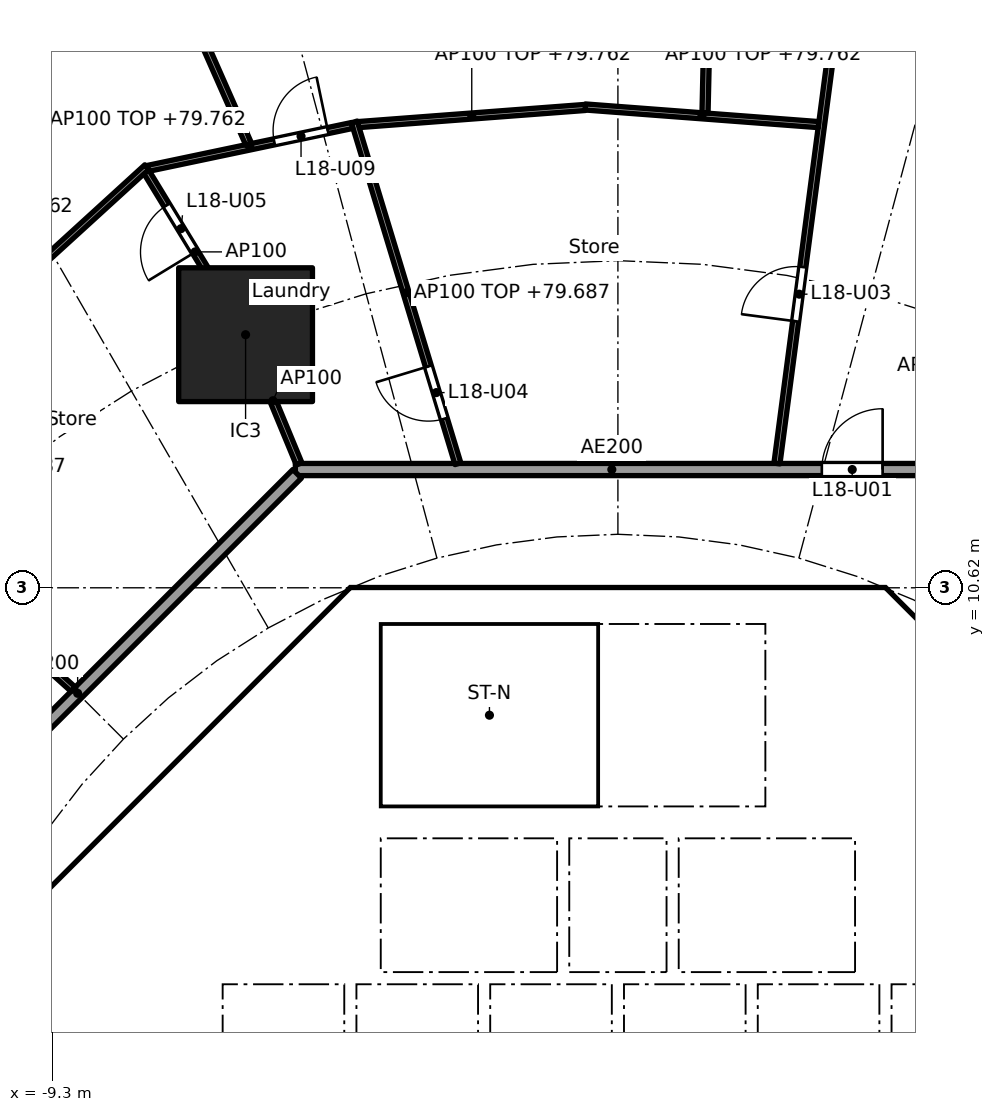
"""IFC4 building model, lengths in metres.
Left out: names, types, materials, properties, quantities, classifications, styles, units other than length and angle.
Written with IfcOpenShell. Run it as: python <this file> out.ifc"""

import sys

from ifc_helpers import new_model, si_unit, direction, frame, frame_2d, origin, origin_2d, place, context, subcontext, project, spatial, polyline, rectangle, outline, extrude, element, fill, save


model = new_model("IFC4")
c1 = context("Model", 3, precision=1e-05, world=origin(), true_north=direction((0.0, 1.0)))
c2 = subcontext(c1, "Body", "Model", "MODEL_VIEW")
j1 = project(units=[si_unit("LENGTHUNIT", "METRE"), si_unit("PLANEANGLEUNIT", "RADIAN")], contexts=[c1])
p1 = place(None, origin())
s1 = spatial("IfcSite", under=j1, at=p1, CompositionType="ELEMENT")
p2 = place(p1, origin())
s2 = spatial("IfcBuilding", under=s1, at=p2, CompositionType="ELEMENT")
p3 = place(p2, frame((0.0, 0.0, 77.0)))
s3 = spatial("IfcBuildingStorey", under=s2, at=p3, CompositionType="ELEMENT", Elevation=77.0)
p4 = place(p3, frame((-6.123, 14.782, 0.0), z_axis=(0.0, 0.0, 1.0), x_axis=(1.0, 0.0, 0.0)))
e1 = element("IfcColumn", 1, at=p4, inside=s3, PredefinedType="COLUMN", context=c2, shape_type="SweptSolid", body=[
    extrude(rectangle(XDim=2.2, YDim=2.2, at=origin_2d()), origin(), (0.0, 0.0, 1.0), 3.7),
])
p5 = place(p3, frame((9.988, 4.613, 0.0), z_axis=(0.0, 0.0, 1.0), x_axis=(-0.707106781187, 0.707106781187, 0.0)))
e2 = element("IfcWall", 2, at=p5, inside=s3, PredefinedType="SHEAR", context=c2, shape_type="SweptSolid", body=[
    extrude(rectangle(XDim=7.602, YDim=0.6, at=frame_2d((3.801, 0.0))), origin(), (0.0, 0.0, 1.0), 3.44),
])
p6 = place(p5, frame((3.201, 0.0, 0.0)))
e3 = element("IfcOpeningElement", 3, at=p6, cuts=e2, PredefinedType="OPENING", context=c2, shape_type="SweptSolid", body=[
    extrude(rectangle(XDim=1.2, YDim=2.1, at=frame_2d((0.6, 1.05))), frame((0.0, 0.31, 0.0), z_axis=(0.0, -1.0, 0.0), x_axis=(1.0, 0.0, 0.0)), (0.0, 0.0, 1.0), 0.62),
])
p7 = place(p3, frame((-4.613, 9.988, 0.0), z_axis=(0.0, 0.0, 1.0), x_axis=(-0.707106781187, -0.707106781187, 0.0)))
e4 = element("IfcWall", 4, at=p7, inside=s3, PredefinedType="SHEAR", context=c2, shape_type="SweptSolid", body=[
    extrude(rectangle(XDim=7.602, YDim=0.6, at=frame_2d((3.801, 0.0))), origin(), (0.0, 0.0, 1.0), 3.44),
])
p8 = place(p7, frame((0.351, 0.0, 0.0)))
e5 = element("IfcOpeningElement", 5, at=p8, cuts=e4, PredefinedType="OPENING", context=c2, shape_type="SweptSolid", body=[
    extrude(rectangle(XDim=1.1, YDim=2.1, at=frame_2d((0.55, 1.05))), frame((0.0, 0.31, 0.0), z_axis=(0.0, -1.0, 0.0), x_axis=(1.0, 0.0, 0.0)), (0.0, 0.0, 1.0), 0.62),
])
p9 = place(p3, frame((-6.2, 4.3, 0.0), z_axis=(0.0, 0.0, 1.0), x_axis=(0.0, 1.0, 0.0)))
e6 = element("IfcWall", 6, at=p9, inside=s3, PredefinedType="PARTITIONING", context=c2, shape_type="SweptSolid", body=[
    extrude(rectangle(XDim=3.527, YDim=0.15, at=frame_2d((1.763, 0.0))), origin(), (0.0, 0.0, 1.0), 3.44),
])
p10 = place(p9, frame((0.262, 0.0, 0.0)))
e7 = element("IfcOpeningElement", 7, at=p10, cuts=e6, PredefinedType="OPENING", context=c2, shape_type="SweptSolid", body=[
    extrude(rectangle(XDim=0.9, YDim=2.1, at=frame_2d((0.45, 1.05))), frame((0.0, 0.085, 0.0), z_axis=(0.0, -1.0, 0.0), x_axis=(1.0, 0.0, 0.0)), (0.0, 0.0, 1.0), 0.17),
])
p11 = place(p9, frame((2.138, 0.0, 0.0)))
e8 = element("IfcOpeningElement", 8, at=p11, cuts=e6, PredefinedType="OPENING", context=c2, shape_type="SweptSolid", body=[
    extrude(rectangle(XDim=0.9, YDim=2.1, at=frame_2d((0.45, 1.05))), frame((0.0, 0.085, 0.0), z_axis=(0.0, -1.0, 0.0), x_axis=(1.0, 0.0, 0.0)), (0.0, 0.0, 1.0), 0.17),
])
p12 = place(p3, frame((4.0, 4.3, 0.0), z_axis=(0.0, 0.0, 1.0), x_axis=(0.0, 1.0, 0.0)))
e9 = element("IfcWall", 9, at=p12, inside=s3, PredefinedType="SOLIDWALL", context=c2, shape_type="SweptSolid", body=[
    extrude(rectangle(XDim=2.2, YDim=0.2, at=frame_2d((1.1, 0.0))), origin(), (0.0, 0.0, 1.0), 3.44),
])
p13 = place(p12, frame((0.55, 0.0, 0.0)))
e10 = element("IfcOpeningElement", 10, at=p13, cuts=e9, PredefinedType="OPENING", context=c2, shape_type="SweptSolid", body=[
    extrude(rectangle(XDim=1.1, YDim=2.1, at=frame_2d((0.55, 1.05))), frame((0.0, 0.11, 0.0), z_axis=(0.0, -1.0, 0.0), x_axis=(1.0, 0.0, 0.0)), (0.0, 0.0, 1.0), 0.22),
])
p14 = place(p3, frame((-4.0, 4.3, 0.0), z_axis=(0.0, 0.0, 1.0), x_axis=(0.0, 1.0, 0.0)))
e11 = element("IfcWall", 11, at=p14, inside=s3, PredefinedType="SOLIDWALL", context=c2, shape_type="SweptSolid", body=[
    extrude(rectangle(XDim=2.2, YDim=0.2, at=frame_2d((1.1, 0.0))), origin(), (0.0, 0.0, 1.0), 3.44),
])
p15 = place(p14, frame((0.55, 0.0, 0.0)))
e12 = element("IfcOpeningElement", 12, at=p15, cuts=e11, PredefinedType="OPENING", context=c2, shape_type="SweptSolid", body=[
    extrude(rectangle(XDim=1.1, YDim=2.1, at=frame_2d((0.55, 1.05))), frame((0.0, 0.11, 0.0), z_axis=(0.0, -1.0, 0.0), x_axis=(1.0, 0.0, 0.0)), (0.0, 0.0, 1.0), 0.22),
])
p16 = place(p3, frame((4.0, 7.025, 0.0), z_axis=(0.0, 0.0, 1.0), x_axis=(0.0, 1.0, 0.0)))
e13 = element("IfcWall", 13, at=p16, inside=s3, PredefinedType="SOLIDWALL", context=c2, shape_type="SweptSolid", body=[
    extrude(rectangle(XDim=3.0, YDim=0.2, at=frame_2d((1.5, 0.0))), origin(), (0.0, 0.0, 1.0), 3.44),
])
p17 = place(p16, frame((0.925, 0.0, 0.0)))
e14 = element("IfcOpeningElement", 14, at=p17, cuts=e13, PredefinedType="OPENING", context=c2, shape_type="SweptSolid", body=[
    extrude(rectangle(XDim=1.1, YDim=2.1, at=frame_2d((0.55, 1.05))), frame((0.0, 0.11, 0.0), z_axis=(0.0, -1.0, 0.0), x_axis=(1.0, 0.0, 0.0)), (0.0, 0.0, 1.0), 0.22),
])
p18 = place(p3, origin())
e15 = element("IfcWall", 15, at=p18, inside=s3, PredefinedType="SHEAR", context=c2, shape_type="SweptSolid", body=[
    extrude(outline(polyline([(-4.152, 10.025), (-4.401, 9.776), (-4.825, 10.2), (-4.401, 10.625), (4.401, 10.625), (4.825, 10.2), (4.401, 9.776), (4.152, 10.025), (-4.152, 10.025)])), origin(), (0.0, 0.0, 1.0), 3.44),
])
p19 = place(p3, frame((-10.025, 4.0, 0.0), z_axis=(0.0, 0.0, 1.0), x_axis=(1.0, 0.0, 0.0)))
e16 = element("IfcWall", 16, at=p19, inside=s3, PredefinedType="PARTITIONING", context=c2, shape_type="SweptSolid", body=[
    extrude(rectangle(XDim=3.325, YDim=0.2, at=frame_2d((1.662, 0.0))), origin(), (0.0, 0.0, 1.0), 3.44),
])
p20 = place(p3, frame((-8.301, 5.8, 0.0), z_axis=(0.0, 0.0, 1.0), x_axis=(1.0, 0.0, 0.0)))
e17 = element("IfcWall", 17, at=p20, inside=s3, PredefinedType="PARTITIONING", context=c2, shape_type="SweptSolid", body=[
    extrude(rectangle(XDim=2.026, YDim=0.15, at=frame_2d((1.013, 0.0))), origin(), (0.0, 0.0, 1.0), 3.44),
])
for number, where, z_axis, x_axis in (
    (18, (-0.9, 4.3, 0.0), (0.0, 0.0, 1.0), (0.0, 1.0, 0.0)),
    (19, (0.9, 4.3, 0.0), (0.0, 0.0, 1.0), (0.0, 1.0, 0.0)),
):
    element("IfcWall", number, at=place(p3, frame(where, z_axis=z_axis, x_axis=x_axis)), inside=s3, PredefinedType="SOLIDWALL", context=c2, shape_type="SweptSolid", body=[
        extrude(rectangle(XDim=2.2, YDim=0.2, at=frame_2d((1.1, 0.0))), origin(), (0.0, 0.0, 1.0), 3.44),
    ])
p21 = place(p3, origin())
e20 = element("IfcWall", 20, at=p21, inside=s3, PredefinedType="SOLIDWALL", context=c2, shape_type="SweptSolid", body=[
    extrude(outline(polyline([(-6.5, 2.1), (-6.7, 2.1), (-6.7, 4.3), (6.7, 4.3), (6.7, 2.1), (6.5, 2.1), (6.5, 4.1), (4.5, 4.1), (4.5, 2.1), (4.3, 2.1), (4.3, 4.1), (2.3, 4.1), (2.3, 2.1), (2.1, 2.1), (2.1, 4.1), (0.1, 4.1), (0.1, 2.1), (-0.1, 2.1), (-0.1, 4.1), (-2.1, 4.1), (-2.1, 2.1), (-2.3, 2.1), (-2.3, 4.1), (-4.3, 4.1), (-4.3, 2.1), (-4.5, 2.1), (-4.5, 4.1), (-6.5, 4.1), (-6.5, 2.1)])), origin(), (0.0, 0.0, 1.0), 3.44),
])
p22 = place(p3, origin())
e21 = element("IfcWall", 21, at=p22, inside=s3, PredefinedType="SOLIDWALL", context=c2, shape_type="SweptSolid", body=[
    extrude(outline(polyline([(-3.9, 7.025), (-4.1, 7.025), (-4.1, 10.025), (-3.9, 10.025), (-3.9, 7.025)])), origin(), (0.0, 0.0, 1.0), 3.44),
])
p23 = place(p3, origin())
e22 = element("IfcWall", 22, at=p23, inside=s3, PredefinedType="SOLIDWALL", context=c2, shape_type="SweptSolid", body=[
    extrude(outline(polyline([(4.1, 6.5), (-4.1, 6.5), (-4.1, 7.025), (4.1, 7.025), (4.1, 6.5)])), origin(), (0.0, 0.0, 1.0), 3.44),
])
p24 = place(p3, frame((5.104, 12.565, 0.0), z_axis=(0.0, 0.0, 1.0), x_axis=(-1.0, 0.0, 0.0)))
e23 = element("IfcWall", 23, at=p24, inside=s3, PredefinedType="PARTITIONING", context=c2, shape_type="SweptSolid", body=[
    extrude(rectangle(XDim=10.409, YDim=0.2, at=frame_2d((5.205, 0.0))), origin(), (0.0, 0.0, 1.0), 3.44),
])
p25 = place(p24, frame((0.751, 0.0, 0.0)))
e24 = element("IfcOpeningElement", 24, at=p25, cuts=e23, PredefinedType="OPENING", context=c2, shape_type="SweptSolid", body=[
    extrude(rectangle(XDim=1.0, YDim=2.1, at=frame_2d((0.5, 1.05))), frame((0.0, 0.11, 0.0), z_axis=(0.0, -1.0, 0.0), x_axis=(1.0, 0.0, 0.0)), (0.0, 0.0, 1.0), 0.22),
])
p26 = place(p3, frame((-5.275, 12.494, 0.0), z_axis=(0.0, 0.0, 1.0), x_axis=(-0.707106781187, -0.707106781187, 0.0)))
e25 = element("IfcWall", 25, at=p26, inside=s3, PredefinedType="PARTITIONING", context=c2, shape_type="SweptSolid", body=[
    extrude(rectangle(XDim=10.209, YDim=0.2, at=frame_2d((5.104, 0.0))), origin(), (0.0, 0.0, 1.0), 3.44),
])
p27 = place(p3, frame((2.615, 12.664, 0.0), z_axis=(0.0, 0.0, 1.0), x_axis=(0.130614967904, 0.99143316979, 0.0)))
e26 = element("IfcWall", 26, at=p27, inside=s3, PredefinedType="PARTITIONING", context=c2, shape_type="SweptSolid", body=[
    extrude(rectangle(XDim=20.034, YDim=0.1, at=frame_2d((10.017, 0.0))), origin(), (0.0, 0.0, 1.0), 2.687),
])
p28 = place(p27, frame((2.359, 0.0, 0.0)))
e27 = element("IfcOpeningElement", 27, at=p28, cuts=e26, PredefinedType="OPENING", context=c2, shape_type="SweptSolid", body=[
    extrude(rectangle(XDim=0.9, YDim=2.1, at=frame_2d((0.45, 1.05))), frame((0.0, 0.06, 0.0), z_axis=(0.0, -1.0, 0.0), x_axis=(1.0, 0.0, 0.0)), (0.0, 0.0, 1.0), 0.12),
])
p29 = place(p27, frame((8.873, 0.0, 0.0)))
e28 = element("IfcOpeningElement", 28, at=p29, cuts=e26, PredefinedType="OPENING", context=c2, shape_type="SweptSolid", body=[
    extrude(rectangle(XDim=0.9, YDim=2.1, at=frame_2d((0.45, 1.05))), frame((0.0, 0.06, 0.0), z_axis=(0.0, -1.0, 0.0), x_axis=(1.0, 0.0, 0.0)), (0.0, 0.0, 1.0), 0.12),
])
p30 = place(p3, frame((3.299, 18.237, 0.0), z_axis=(0.0, 0.0, 1.0), x_axis=(-0.997152243414, 0.075414875552, 0.0)))
e29 = element("IfcWall", 29, at=p30, inside=s3, PredefinedType="PARTITIONING", context=c2, shape_type="SweptSolid", body=[
    extrude(rectangle(XDim=3.846, YDim=0.1, at=frame_2d((1.923, 0.0))), origin(), (0.0, 0.0, 1.0), 2.762),
])
p31 = place(p3, frame((1.433, 18.428, 0.0), z_axis=(0.0, 0.0, 1.0), x_axis=(0.022419421812, 0.999748653175, 0.0)))
e30 = element("IfcWall", 30, at=p31, inside=s3, PredefinedType="PARTITIONING", context=c2, shape_type="SweptSolid", body=[
    extrude(rectangle(XDim=7.438, YDim=0.1, at=frame_2d((3.719, 0.0))), origin(), (0.0, 0.0, 1.0), 3.44),
])
p32 = place(p3, frame((-0.536, 18.519, 0.0), z_axis=(0.0, 0.0, 1.0), x_axis=(-0.99715294352, -0.075405618017, 0.0)))
e31 = element("IfcWall", 31, at=p32, inside=s3, PredefinedType="PARTITIONING", context=c2, shape_type="SweptSolid", body=[
    extrude(rectangle(XDim=3.746, YDim=0.1, at=frame_2d((1.873, 0.0))), origin(), (0.0, 0.0, 1.0), 2.762),
])
p33 = place(p3, frame((-2.631, 12.66, 0.0), z_axis=(0.0, 0.0, 1.0), x_axis=(-0.290145836284, 0.956982441682, 0.0)))
e32 = element("IfcWall", 32, at=p33, inside=s3, PredefinedType="PARTITIONING", context=c2, shape_type="SweptSolid", body=[
    extrude(rectangle(XDim=5.873, YDim=0.1, at=frame_2d((2.937, 0.0))), origin(), (0.0, 0.0, 1.0), 2.687),
])
p34 = place(p33, frame((0.772, 0.0, 0.0)))
e33 = element("IfcOpeningElement", 33, at=p34, cuts=e32, PredefinedType="OPENING", context=c2, shape_type="SweptSolid", body=[
    extrude(rectangle(XDim=0.9, YDim=2.1, at=frame_2d((0.45, 1.05))), frame((0.0, 0.06, 0.0), z_axis=(0.0, -1.0, 0.0), x_axis=(1.0, 0.0, 0.0)), (0.0, 0.0, 1.0), 0.12),
])
p35 = place(p3, frame((-4.37, 18.223, 0.0), z_axis=(0.0, 0.0, 1.0), x_axis=(-0.978619056583, -0.205681166112, 0.0)))
e34 = element("IfcWall", 34, at=p35, inside=s3, PredefinedType="PARTITIONING", context=c2, shape_type="SweptSolid", body=[
    extrude(rectangle(XDim=3.438, YDim=0.1, at=frame_2d((1.719, 0.0))), origin(), (0.0, 0.0, 1.0), 2.762),
])
p36 = place(p35, frame((0.409, 0.0, 0.0)))
e35 = element("IfcOpeningElement", 35, at=p36, cuts=e34, PredefinedType="OPENING", context=c2, shape_type="SweptSolid", body=[
    extrude(rectangle(XDim=0.9, YDim=2.1, at=frame_2d((0.45, 1.05))), frame((0.0, 0.06, 0.0), z_axis=(0.0, -1.0, 0.0), x_axis=(1.0, 0.0, 0.0)), (0.0, 0.0, 1.0), 0.12),
])
p37 = place(p3, frame((-6.072, 17.915, 0.0), z_axis=(0.0, 0.0, 1.0), x_axis=(-0.404139814253, 0.914697223422, 0.0)))
e36 = element("IfcWall", 36, at=p37, inside=s3, PredefinedType="PARTITIONING", context=c2, shape_type="SweptSolid", body=[
    extrude(rectangle(XDim=15.614, YDim=0.1, at=frame_2d((7.807, 0.0))), origin(), (0.0, 0.0, 1.0), 2.837),
])
p38 = place(p37, frame((3.226, 0.0, 0.0)))
e37 = element("IfcOpeningElement", 37, at=p38, cuts=e36, PredefinedType="OPENING", context=c2, shape_type="SweptSolid", body=[
    extrude(rectangle(XDim=0.9, YDim=2.1, at=frame_2d((0.45, 1.05))), frame((0.0, 0.06, 0.0), z_axis=(0.0, -1.0, 0.0), x_axis=(1.0, 0.0, 0.0)), (0.0, 0.0, 1.0), 0.12),
])
p39 = place(p3, frame((-5.243, 12.657, 0.0), z_axis=(0.0, 0.0, 1.0), x_axis=(-0.382703272338, 0.923871314276, 0.0)))
e38 = element("IfcWall", 38, at=p39, inside=s3, PredefinedType="PARTITIONING", context=c2, shape_type="SweptSolid", body=[
    extrude(rectangle(XDim=2.249, YDim=0.1, at=frame_2d((1.125, 0.0))), origin(), (0.0, 0.0, 1.0), 3.44),
])
p40 = place(p3, frame((-6.149, 14.825, 0.0), z_axis=(0.0, 0.0, 1.0), x_axis=(-0.520433196839, 0.853902387646, 0.0)))
e39 = element("IfcWall", 39, at=p40, inside=s3, PredefinedType="PARTITIONING", context=c2, shape_type="SweptSolid", body=[
    extrude(rectangle(XDim=3.09, YDim=0.1, at=frame_2d((1.545, 0.0))), origin(), (0.0, 0.0, 1.0), 3.44),
])
p41 = place(p40, frame((1.542, 0.0, 0.0)))
e40 = element("IfcOpeningElement", 40, at=p41, cuts=e39, PredefinedType="OPENING", context=c2, shape_type="SweptSolid", body=[
    extrude(rectangle(XDim=0.9, YDim=2.1, at=frame_2d((0.45, 1.05))), frame((0.0, 0.06, 0.0), z_axis=(0.0, -1.0, 0.0), x_axis=(1.0, 0.0, 0.0)), (0.0, 0.0, 1.0), 0.12),
])
p42 = place(p3, frame((-7.746, 17.539, 0.0), z_axis=(0.0, 0.0, 1.0), x_axis=(-0.738860434967, -0.673858484877, 0.0)))
e41 = element("IfcWall", 41, at=p42, inside=s3, PredefinedType="PARTITIONING", context=c2, shape_type="SweptSolid", body=[
    extrude(rectangle(XDim=4.947, YDim=0.1, at=frame_2d((2.473, 0.0))), origin(), (0.0, 0.0, 1.0), 2.762),
])
p43 = place(p3, frame((-8.959, 8.952, 0.0), z_axis=(0.0, 0.0, 1.0), x_axis=(-0.742679904999, 0.669646592398, 0.0)))
e42 = element("IfcWall", 42, at=p43, inside=s3, PredefinedType="PARTITIONING", context=c2, shape_type="SweptSolid", body=[
    extrude(rectangle(XDim=12.121, YDim=0.1, at=frame_2d((6.061, 0.0))), origin(), (0.0, 0.0, 1.0), 2.687),
])
p44 = place(p43, frame((2.172, 0.0, 0.0)))
e43 = element("IfcOpeningElement", 43, at=p44, cuts=e42, PredefinedType="OPENING", context=c2, shape_type="SweptSolid", body=[
    extrude(rectangle(XDim=0.9, YDim=2.1, at=frame_2d((0.45, 1.05))), frame((0.0, 0.06, 0.0), z_axis=(0.0, -1.0, 0.0), x_axis=(1.0, 0.0, 0.0)), (0.0, 0.0, 1.0), 0.12),
])
p45 = place(p43, frame((8.233, 0.0, 0.0)))
e44 = element("IfcOpeningElement", 44, at=p45, cuts=e42, PredefinedType="OPENING", context=c2, shape_type="SweptSolid", body=[
    extrude(rectangle(XDim=0.9, YDim=2.1, at=frame_2d((0.45, 1.05))), frame((0.0, 0.06, 0.0), z_axis=(0.0, -1.0, 0.0), x_axis=(1.0, 0.0, 0.0)), (0.0, 0.0, 1.0), 0.12),
])
p46 = place(p13, origin())
e45 = element("IfcDoor", 45, at=p46, inside=s3, OperationType="DOUBLE_DOOR_SLIDING", PredefinedType="DOOR", context=c2, shape_type="SweptSolid", body=[
    extrude(rectangle(XDim=1.1, YDim=2.1, at=frame_2d((0.55, 1.05))), frame((0.0, 0.025, 0.0), z_axis=(0.0, -1.0, 0.0), x_axis=(1.0, 0.0, 0.0)), (0.0, 0.0, 1.0), 0.05),
])
fill(e10, e45)
p47 = place(p15, origin())
e46 = element("IfcDoor", 46, at=p47, inside=s3, OperationType="DOUBLE_DOOR_SLIDING", PredefinedType="DOOR", context=c2, shape_type="SweptSolid", body=[
    extrude(rectangle(XDim=1.1, YDim=2.1, at=frame_2d((0.55, 1.05))), frame((0.0, 0.025, 0.0), z_axis=(0.0, -1.0, 0.0), x_axis=(1.0, 0.0, 0.0)), (0.0, 0.0, 1.0), 0.05),
])
fill(e12, e46)
p48 = place(p17, origin())
e47 = element("IfcDoor", 47, at=p48, inside=s3, OperationType="SINGLE_SWING_RIGHT", PredefinedType="DOOR", context=c2, shape_type="SweptSolid", body=[
    extrude(rectangle(XDim=1.1, YDim=2.1, at=frame_2d((0.55, 1.05))), frame((0.0, 0.025, 0.0), z_axis=(0.0, -1.0, 0.0), x_axis=(1.0, 0.0, 0.0)), (0.0, 0.0, 1.0), 0.05),
])
fill(e14, e47)
p49 = place(p10, origin())
e48 = element("IfcDoor", 48, at=p49, inside=s3, OperationType="SINGLE_SWING_LEFT", PredefinedType="DOOR", context=c2, shape_type="SweptSolid", body=[
    extrude(rectangle(XDim=0.9, YDim=2.1, at=frame_2d((0.45, 1.05))), frame((0.0, 0.025, 0.0), z_axis=(0.0, -1.0, 0.0), x_axis=(1.0, 0.0, 0.0)), (0.0, 0.0, 1.0), 0.05),
])
fill(e7, e48)
p50 = place(p11, origin())
e49 = element("IfcDoor", 49, at=p50, inside=s3, OperationType="SINGLE_SWING_LEFT", PredefinedType="DOOR", context=c2, shape_type="SweptSolid", body=[
    extrude(rectangle(XDim=0.9, YDim=2.1, at=frame_2d((0.45, 1.05))), frame((0.0, 0.025, 0.0), z_axis=(0.0, -1.0, 0.0), x_axis=(1.0, 0.0, 0.0)), (0.0, 0.0, 1.0), 0.05),
])
fill(e8, e49)
p51 = place(p8, origin())
e50 = element("IfcDoor", 50, at=p51, inside=s3, OperationType="SINGLE_SWING_LEFT", PredefinedType="DOOR", context=c2, shape_type="SweptSolid", body=[
    extrude(rectangle(XDim=1.1, YDim=2.1, at=frame_2d((0.55, 1.05))), frame((0.0, 0.025, 0.0), z_axis=(0.0, -1.0, 0.0), x_axis=(1.0, 0.0, 0.0)), (0.0, 0.0, 1.0), 0.05),
])
fill(e5, e50)
p52 = place(p25, frame((1.0, 0.0, 0.0), x_axis=(-1.0, 0.0, 0.0)))
e51 = element("IfcDoor", 51, at=p52, inside=s3, OperationType="SINGLE_SWING_RIGHT", PredefinedType="DOOR", context=c2, shape_type="SweptSolid", body=[
    extrude(rectangle(XDim=1.0, YDim=2.1, at=frame_2d((0.5, 1.05))), frame((0.0, 0.025, 0.0), z_axis=(0.0, -1.0, 0.0), x_axis=(1.0, 0.0, 0.0)), (0.0, 0.0, 1.0), 0.05),
])
fill(e24, e51)
p53 = place(p28, origin())
e52 = element("IfcDoor", 52, at=p53, inside=s3, OperationType="SINGLE_SWING_LEFT", PredefinedType="DOOR", context=c2, shape_type="SweptSolid", body=[
    extrude(rectangle(XDim=0.9, YDim=2.1, at=frame_2d((0.45, 1.05))), frame((0.0, 0.025, 0.0), z_axis=(0.0, -1.0, 0.0), x_axis=(1.0, 0.0, 0.0)), (0.0, 0.0, 1.0), 0.05),
])
fill(e27, e52)
p54 = place(p34, origin())
e53 = element("IfcDoor", 53, at=p54, inside=s3, OperationType="SINGLE_SWING_RIGHT", PredefinedType="DOOR", context=c2, shape_type="SweptSolid", body=[
    extrude(rectangle(XDim=0.9, YDim=2.1, at=frame_2d((0.45, 1.05))), frame((0.0, 0.025, 0.0), z_axis=(0.0, -1.0, 0.0), x_axis=(1.0, 0.0, 0.0)), (0.0, 0.0, 1.0), 0.05),
])
fill(e33, e53)
p55 = place(p41, origin())
e54 = element("IfcDoor", 54, at=p55, inside=s3, OperationType="SINGLE_SWING_LEFT", PredefinedType="DOOR", context=c2, shape_type="SweptSolid", body=[
    extrude(rectangle(XDim=0.9, YDim=2.1, at=frame_2d((0.45, 1.05))), frame((0.0, 0.025, 0.0), z_axis=(0.0, -1.0, 0.0), x_axis=(1.0, 0.0, 0.0)), (0.0, 0.0, 1.0), 0.05),
])
fill(e40, e54)
p56 = place(p36, frame((0.9, 0.0, 0.0), x_axis=(-1.0, 0.0, 0.0)))
e55 = element("IfcDoor", 55, at=p56, inside=s3, OperationType="SINGLE_SWING_RIGHT", PredefinedType="DOOR", context=c2, shape_type="SweptSolid", body=[
    extrude(rectangle(XDim=0.9, YDim=2.1, at=frame_2d((0.45, 1.05))), frame((0.0, 0.025, 0.0), z_axis=(0.0, -1.0, 0.0), x_axis=(1.0, 0.0, 0.0)), (0.0, 0.0, 1.0), 0.05),
])
fill(e35, e55)
save(model, sys.argv[1])
